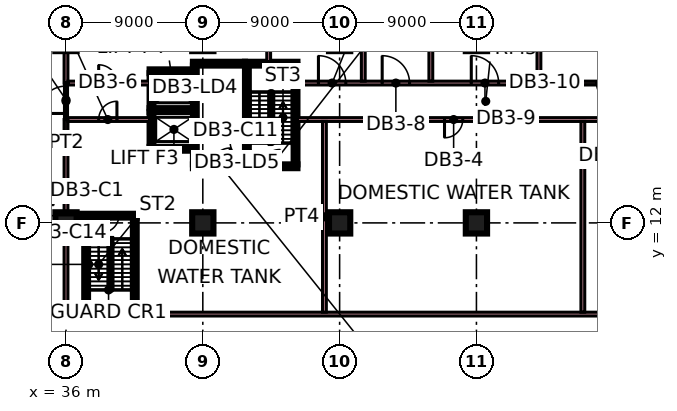
"""IFC4 building model, lengths in metres.
Left out: names, types, materials, properties, quantities, classifications, styles, units other than length and angle.
Written with IfcOpenShell. Run it as: python <this file> out.ifc"""

import sys

from ifc_helpers import new_model, si_unit, direction, frame, frame_2d, origin, origin_2d, place, context, subcontext, project, spatial, rectangle, extrude, element, fill, save


model = new_model("IFC4")
c1 = context("Model", 3, precision=1e-05, world=origin(), true_north=direction((0.0, 1.0)))
c2 = subcontext(c1, "Body", "Model", "MODEL_VIEW")
j1 = project(units=[si_unit("LENGTHUNIT", "METRE"), si_unit("PLANEANGLEUNIT", "RADIAN")], contexts=[c1])
p1 = place(None, origin())
s1 = spatial("IfcSite", under=j1, at=p1, CompositionType="ELEMENT")
p2 = place(p1, origin())
s2 = spatial("IfcBuilding", under=s1, at=p2, CompositionType="ELEMENT")
p3 = place(p2, frame((0.0, 0.0, -13.5)))
s3 = spatial("IfcBuildingStorey", under=s2, at=p3, CompositionType="ELEMENT", Elevation=-13.5)
for number, where, z_axis, x_axis in (
    (1, (36.0, 12.0, 0.0), (0.0, 0.0, 1.0), (1.0, 0.0, 0.0)),
    (2, (45.0, 12.0, 0.0), (0.0, 0.0, 1.0), (1.0, 0.0, 0.0)),
    (3, (54.0, 12.0, 0.0), (0.0, 0.0, 1.0), (1.0, 0.0, 0.0)),
    (4, (63.0, 12.0, 0.0), (0.0, 0.0, 1.0), (1.0, 0.0, 0.0)),
):
    element("IfcColumn", number, at=place(p3, frame(where, z_axis=z_axis, x_axis=x_axis)), inside=s3, PredefinedType="COLUMN", context=c2, shape_type="SweptSolid", body=[
        extrude(rectangle(XDim=1.4, YDim=1.4, at=origin_2d()), origin(), (0.0, 0.0, 1.0), 4.5),
    ])
p4 = place(p3, frame((37.2, 5.725, 0.0), z_axis=(0.0, 0.0, 1.0), x_axis=(1.0, 0.0, 0.0)))
e5 = element("IfcWall", 5, at=p4, inside=s3, PredefinedType="SHEAR", context=c2, shape_type="SweptSolid", body=[
    extrude(rectangle(XDim=3.45, YDim=0.25, at=frame_2d((1.725, 0.0))), origin(), (0.0, 0.0, 1.0), 4.5),
])
p5 = place(p3, frame((36.7, 12.475, 0.0), z_axis=(0.0, 0.0, 1.0), x_axis=(1.0, 0.0, 0.0)))
e6 = element("IfcWall", 6, at=p5, inside=s3, PredefinedType="SHEAR", context=c2, shape_type="SweptSolid", body=[
    extrude(rectangle(XDim=3.95, YDim=0.25, at=frame_2d((1.975, 0.0))), origin(), (0.0, 0.0, 1.0), 4.5),
])
p6 = place(p5, frame((1.675, 0.0, 0.0)))
e7 = element("IfcOpeningElement", 7, at=p6, cuts=e6, PredefinedType="OPENING", context=c2, shape_type="SweptSolid", body=[
    extrude(rectangle(XDim=1.1, YDim=2.2, at=frame_2d((0.55, 1.1))), frame((0.0, 0.135, 0.0), z_axis=(0.0, -1.0, 0.0), x_axis=(1.0, 0.0, 0.0)), (0.0, 0.0, 1.0), 0.27),
])
for number, where, z_axis, x_axis in (
    (8, (37.325, 5.85, 0.0), (0.0, 0.0, 1.0), (0.0, 1.0, 0.0)),
    (9, (40.525, 5.85, 0.0), (0.0, 0.0, 1.0), (0.0, 1.0, 0.0)),
):
    element("IfcWall", number, at=place(p3, frame(where, z_axis=z_axis, x_axis=x_axis)), inside=s3, PredefinedType="SHEAR", context=c2, shape_type="SweptSolid", body=[
        extrude(rectangle(XDim=6.5, YDim=0.25, at=frame_2d((3.25, 0.0))), origin(), (0.0, 0.0, 1.0), 4.5),
    ])
p7 = place(p3, frame((47.775, 15.725, 0.0), z_axis=(0.0, 0.0, 1.0), x_axis=(1.0, 0.0, 0.0)))
e10 = element("IfcWall", 10, at=p7, inside=s3, PredefinedType="SHEAR", context=c2, shape_type="SweptSolid", body=[
    extrude(rectangle(XDim=3.45, YDim=0.25, at=frame_2d((1.725, 0.0))), origin(), (0.0, 0.0, 1.0), 4.5),
])
p8 = place(p7, frame((1.175, 0.0, 0.0)))
e11 = element("IfcOpeningElement", 11, at=p8, cuts=e10, PredefinedType="OPENING", context=c2, shape_type="SweptSolid", body=[
    extrude(rectangle(XDim=1.1, YDim=2.2, at=frame_2d((0.55, 1.1))), frame((0.0, 0.135, 0.0), z_axis=(0.0, -1.0, 0.0), x_axis=(1.0, 0.0, 0.0)), (0.0, 0.0, 1.0), 0.27),
])
p9 = place(p3, frame((47.775, 22.475, 0.0), z_axis=(0.0, 0.0, 1.0), x_axis=(1.0, 0.0, 0.0)))
e12 = element("IfcWall", 12, at=p9, inside=s3, PredefinedType="SHEAR", context=c2, shape_type="SweptSolid", body=[
    extrude(rectangle(XDim=3.45, YDim=0.25, at=frame_2d((1.725, 0.0))), origin(), (0.0, 0.0, 1.0), 4.5),
])
p10 = place(p3, frame((47.9, 15.85, 0.0), z_axis=(0.0, 0.0, 1.0), x_axis=(0.0, 1.0, 0.0)))
e13 = element("IfcWall", 13, at=p10, inside=s3, PredefinedType="SHEAR", context=c2, shape_type="SweptSolid", body=[
    extrude(rectangle(XDim=6.5, YDim=0.25, at=frame_2d((3.25, 0.0))), origin(), (0.0, 0.0, 1.0), 4.5),
])
p11 = place(p10, frame((0.35, 0.0, 0.0)))
e14 = element("IfcOpeningElement", 14, at=p11, cuts=e13, PredefinedType="OPENING", context=c2, shape_type="SweptSolid", body=[
    extrude(rectangle(XDim=1.1, YDim=2.2, at=frame_2d((0.55, 1.1))), frame((0.0, 0.135, 0.0), z_axis=(0.0, -1.0, 0.0), x_axis=(1.0, 0.0, 0.0)), (0.0, 0.0, 1.0), 0.27),
])
p12 = place(p3, frame((51.1, 15.85, 0.0), z_axis=(0.0, 0.0, 1.0), x_axis=(0.0, 1.0, 0.0)))
e15 = element("IfcWall", 15, at=p12, inside=s3, PredefinedType="SHEAR", context=c2, shape_type="SweptSolid", body=[
    extrude(rectangle(XDim=6.5, YDim=0.25, at=frame_2d((3.25, 0.0))), origin(), (0.0, 0.0, 1.0), 4.5),
])
p13 = place(p3, frame((44.35, 15.725, 0.0), z_axis=(0.0, 0.0, 1.0), x_axis=(1.0, 0.0, 0.0)))
e16 = element("IfcWall", 16, at=p13, inside=s3, PredefinedType="SHEAR", context=c2, shape_type="SweptSolid", body=[
    extrude(rectangle(XDim=3.425, YDim=0.25, at=frame_2d((1.712, 0.0))), origin(), (0.0, 0.0, 1.0), 4.5),
])
p14 = place(p13, frame((1.25, 0.0, 0.0)))
e17 = element("IfcOpeningElement", 17, at=p14, cuts=e16, PredefinedType="OPENING", context=c2, shape_type="SweptSolid", body=[
    extrude(rectangle(XDim=1.2, YDim=2.2, at=frame_2d((0.6, 1.1))), frame((0.0, 0.135, 0.0), z_axis=(0.0, -1.0, 0.0), x_axis=(1.0, 0.0, 0.0)), (0.0, 0.0, 1.0), 0.27),
])
p15 = place(p3, frame((44.35, 22.475, 0.0), z_axis=(0.0, 0.0, 1.0), x_axis=(1.0, 0.0, 0.0)))
e18 = element("IfcWall", 18, at=p15, inside=s3, PredefinedType="SHEAR", context=c2, shape_type="SweptSolid", body=[
    extrude(rectangle(XDim=3.425, YDim=0.25, at=frame_2d((1.712, 0.0))), origin(), (0.0, 0.0, 1.0), 4.5),
])
p16 = place(p3, frame((44.475, 15.85, 0.0), z_axis=(0.0, 0.0, 1.0), x_axis=(0.0, 1.0, 0.0)))
e19 = element("IfcWall", 19, at=p16, inside=s3, PredefinedType="SHEAR", context=c2, shape_type="SweptSolid", body=[
    extrude(rectangle(XDim=6.5, YDim=0.25, at=frame_2d((3.25, 0.0))), origin(), (0.0, 0.0, 1.0), 4.5),
])
p17 = place(p16, frame((1.75, 0.0, 0.0)))
e20 = element("IfcOpeningElement", 20, at=p17, cuts=e19, PredefinedType="OPENING", context=c2, shape_type="SweptSolid", body=[
    extrude(rectangle(XDim=1.1, YDim=2.2, at=frame_2d((0.55, 1.1))), frame((0.0, 0.135, 0.0), z_axis=(0.0, -1.0, 0.0), x_axis=(1.0, 0.0, 0.0)), (0.0, 0.0, 1.0), 0.27),
])
p18 = place(p16, frame((4.3, 0.0, 0.0)))
e21 = element("IfcOpeningElement", 21, at=p18, cuts=e19, PredefinedType="OPENING", context=c2, shape_type="SweptSolid", body=[
    extrude(rectangle(XDim=1.1, YDim=2.2, at=frame_2d((0.55, 1.1))), frame((0.0, 0.135, 0.0), z_axis=(0.0, -1.0, 0.0), x_axis=(1.0, 0.0, 0.0)), (0.0, 0.0, 1.0), 0.27),
])
for number, where, z_axis, x_axis in (
    (22, (41.5, 16.875, 0.0), (0.0, 0.0, 1.0), (1.0, 0.0, 0.0)),
    (23, (41.5, 19.425, 0.0), (0.0, 0.0, 1.0), (1.0, 0.0, 0.0)),
    (24, (41.5, 21.975, 0.0), (0.0, 0.0, 1.0), (1.0, 0.0, 0.0)),
):
    element("IfcWall", number, at=place(p3, frame(where, z_axis=z_axis, x_axis=x_axis)), inside=s3, PredefinedType="SHEAR", context=c2, shape_type="SweptSolid", body=[
        extrude(rectangle(XDim=2.85, YDim=0.25, at=frame_2d((1.425, 0.0))), origin(), (0.0, 0.0, 1.0), 4.5),
    ])
for number, where, z_axis, x_axis in (
    (25, (41.625, 17.0, 0.0), (0.0, 0.0, 1.0), (0.0, 1.0, 0.0)),
    (26, (41.625, 19.55, 0.0), (0.0, 0.0, 1.0), (0.0, 1.0, 0.0)),
):
    element("IfcWall", number, at=place(p3, frame(where, z_axis=z_axis, x_axis=x_axis)), inside=s3, PredefinedType="SHEAR", context=c2, shape_type="SweptSolid", body=[
        extrude(rectangle(XDim=2.3, YDim=0.25, at=frame_2d((1.15, 0.0))), origin(), (0.0, 0.0, 1.0), 4.5),
    ])
p19 = place(p3, frame((36.0, 5.875, 0.0), z_axis=(0.0, 0.0, 1.0), x_axis=(0.0, 1.0, 0.0)))
e27 = element("IfcWall", 27, at=p19, inside=s3, PredefinedType="PARTITIONING", context=c2, shape_type="SweptSolid", body=[
    extrude(rectangle(XDim=5.426, YDim=0.25, at=frame_2d((2.713, 0.0))), origin(), (0.0, 0.0, 1.0), 4.05),
])
p20 = place(p3, frame((36.0, 12.699, 0.0), z_axis=(0.0, 0.0, 1.0), x_axis=(0.0, 1.0, 0.0)))
e28 = element("IfcWall", 28, at=p20, inside=s3, PredefinedType="PARTITIONING", context=c2, shape_type="SweptSolid", body=[
    extrude(rectangle(XDim=6.101, YDim=0.25, at=frame_2d((3.051, 0.0))), origin(), (0.0, 0.0, 1.0), 4.05),
])
p21 = place(p3, frame((36.0, 18.8, 0.0), z_axis=(0.0, 0.0, 1.0), x_axis=(0.0, 1.0, 0.0)))
e29 = element("IfcWall", 29, at=p21, inside=s3, PredefinedType="PARTITIONING", context=c2, shape_type="SweptSolid", body=[
    extrude(rectangle(XDim=2.4, YDim=0.2, at=frame_2d((1.2, 0.0))), origin(), (0.0, 0.0, 1.0), 4.05),
])
p22 = place(p21, frame((0.4, 0.0, 0.0)))
e30 = element("IfcOpeningElement", 30, at=p22, cuts=e29, PredefinedType="OPENING", context=c2, shape_type="SweptSolid", body=[
    extrude(rectangle(XDim=1.8, YDim=2.1, at=frame_2d((0.9, 1.05))), frame((0.0, 0.11, 0.0), z_axis=(0.0, -1.0, 0.0), x_axis=(1.0, 0.0, 0.0)), (0.0, 0.0, 1.0), 0.22),
])
p23 = place(p3, frame((36.0, 21.2, 0.0), z_axis=(0.0, 0.0, 1.0), x_axis=(0.0, 1.0, 0.0)))
e31 = element("IfcWall", 31, at=p23, inside=s3, PredefinedType="PARTITIONING", context=c2, shape_type="SweptSolid", body=[
    extrude(rectangle(XDim=2.101, YDim=0.25, at=frame_2d((1.051, 0.0))), origin(), (0.0, 0.0, 1.0), 4.05),
])
p24 = place(p3, frame((36.125, 6.0, 0.0), z_axis=(0.0, 0.0, 1.0), x_axis=(1.0, 0.0, 0.0)))
e32 = element("IfcWall", 32, at=p24, inside=s3, PredefinedType="PARTITIONING", context=c2, shape_type="SweptSolid", body=[
    extrude(rectangle(XDim=1.075, YDim=0.25, at=frame_2d((0.538, 0.0))), origin(), (0.0, 0.0, 1.0), 4.05),
])
p25 = place(p3, frame((36.125, 18.8, 0.0), z_axis=(0.0, 0.0, 1.0), x_axis=(1.0, 0.0, 0.0)))
e33 = element("IfcWall", 33, at=p25, inside=s3, PredefinedType="PARTITIONING", context=c2, shape_type="SweptSolid", body=[
    extrude(rectangle(XDim=5.375, YDim=0.25, at=frame_2d((2.688, 0.0))), origin(), (0.0, 0.0, 1.0), 4.05),
])
p26 = place(p25, frame((2.025, 0.0, 0.0)))
e34 = element("IfcOpeningElement", 34, at=p26, cuts=e33, PredefinedType="OPENING", context=c2, shape_type="SweptSolid", body=[
    extrude(rectangle(XDim=1.2, YDim=2.1, at=frame_2d((0.6, 1.05))), frame((0.0, 0.135, 0.0), z_axis=(0.0, -1.0, 0.0), x_axis=(1.0, 0.0, 0.0)), (0.0, 0.0, 1.0), 0.27),
])
p27 = place(p3, frame((36.125, 21.2, 0.0), z_axis=(0.0, 0.0, 1.0), x_axis=(1.0, 0.0, 0.0)))
e35 = element("IfcWall", 35, at=p27, inside=s3, PredefinedType="PARTITIONING", context=c2, shape_type="SweptSolid", body=[
    extrude(rectangle(XDim=5.375, YDim=0.25, at=frame_2d((2.688, 0.0))), origin(), (0.0, 0.0, 1.0), 4.05),
])
p28 = place(p27, frame((2.025, 0.0, 0.0)))
e36 = element("IfcOpeningElement", 36, at=p28, cuts=e35, PredefinedType="OPENING", context=c2, shape_type="SweptSolid", body=[
    extrude(rectangle(XDim=1.2, YDim=2.1, at=frame_2d((0.6, 1.05))), frame((0.0, 0.135, 0.0), z_axis=(0.0, -1.0, 0.0), x_axis=(1.0, 0.0, 0.0)), (0.0, 0.0, 1.0), 0.27),
])
p29 = place(p3, frame((40.65, 6.0, 0.0), z_axis=(0.0, 0.0, 1.0), x_axis=(1.0, 0.0, 0.0)))
e37 = element("IfcWall", 37, at=p29, inside=s3, PredefinedType="PARTITIONING", context=c2, shape_type="SweptSolid", body=[
    extrude(rectangle(XDim=35.475, YDim=0.25, at=frame_2d((17.738, 0.0))), origin(), (0.0, 0.0, 1.0), 4.05),
])
p30 = place(p3, frame((49.333, 22.6, 0.0), z_axis=(0.0, 0.0, 1.0), x_axis=(0.0, 1.0, 0.0)))
e38 = element("IfcWall", 38, at=p30, inside=s3, PredefinedType="PARTITIONING", context=c2, shape_type="SweptSolid", body=[
    extrude(rectangle(XDim=9.275, YDim=0.25, at=frame_2d((4.637, 0.0))), origin(), (0.0, 0.0, 1.0), 4.05),
])
p31 = place(p3, frame((51.225, 18.8, 0.0), z_axis=(0.0, 0.0, 1.0), x_axis=(1.0, 0.0, 0.0)))
e39 = element("IfcWall", 39, at=p31, inside=s3, PredefinedType="PARTITIONING", context=c2, shape_type="SweptSolid", body=[
    extrude(rectangle(XDim=24.65, YDim=0.25, at=frame_2d((12.325, 0.0))), origin(), (0.0, 0.0, 1.0), 4.05),
])
p32 = place(p31, frame((9.675, 0.0, 0.0)))
e40 = element("IfcOpeningElement", 40, at=p32, cuts=e39, PredefinedType="OPENING", context=c2, shape_type="SweptSolid", body=[
    extrude(rectangle(XDim=1.2, YDim=2.1, at=frame_2d((0.6, 1.05))), frame((0.0, 0.135, 0.0), z_axis=(0.0, -1.0, 0.0), x_axis=(1.0, 0.0, 0.0)), (0.0, 0.0, 1.0), 0.27),
])
p33 = place(p31, frame((20.925, 0.0, 0.0)))
e41 = element("IfcOpeningElement", 41, at=p33, cuts=e39, PredefinedType="OPENING", context=c2, shape_type="SweptSolid", body=[
    extrude(rectangle(XDim=1.8, YDim=2.1, at=frame_2d((0.9, 1.05))), frame((0.0, 0.135, 0.0), z_axis=(0.0, -1.0, 0.0), x_axis=(1.0, 0.0, 0.0)), (0.0, 0.0, 1.0), 0.27),
])
p34 = place(p3, frame((51.225, 21.2, 0.0), z_axis=(0.0, 0.0, 1.0), x_axis=(1.0, 0.0, 0.0)))
e42 = element("IfcWall", 42, at=p34, inside=s3, PredefinedType="PARTITIONING", context=c2, shape_type="SweptSolid", body=[
    extrude(rectangle(XDim=24.65, YDim=0.25, at=frame_2d((12.325, 0.0))), origin(), (0.0, 0.0, 1.0), 4.05),
])
p35 = place(p34, frame((1.381, 0.0, 0.0)))
e43 = element("IfcOpeningElement", 43, at=p35, cuts=e42, PredefinedType="OPENING", context=c2, shape_type="SweptSolid", body=[
    extrude(rectangle(XDim=1.8, YDim=2.1, at=frame_2d((0.9, 1.05))), frame((0.0, 0.135, 0.0), z_axis=(0.0, -1.0, 0.0), x_axis=(1.0, 0.0, 0.0)), (0.0, 0.0, 1.0), 0.27),
])
p36 = place(p34, frame((5.575, 0.0, 0.0)))
e44 = element("IfcOpeningElement", 44, at=p36, cuts=e42, PredefinedType="OPENING", context=c2, shape_type="SweptSolid", body=[
    extrude(rectangle(XDim=1.8, YDim=2.1, at=frame_2d((0.9, 1.05))), frame((0.0, 0.135, 0.0), z_axis=(0.0, -1.0, 0.0), x_axis=(1.0, 0.0, 0.0)), (0.0, 0.0, 1.0), 0.27),
])
p37 = place(p34, frame((11.436, 0.0, 0.0)))
e45 = element("IfcOpeningElement", 45, at=p37, cuts=e42, PredefinedType="OPENING", context=c2, shape_type="SweptSolid", body=[
    extrude(rectangle(XDim=1.8, YDim=2.1, at=frame_2d((0.9, 1.05))), frame((0.0, 0.135, 0.0), z_axis=(0.0, -1.0, 0.0), x_axis=(1.0, 0.0, 0.0)), (0.0, 0.0, 1.0), 0.27),
])
p38 = place(p34, frame((19.675, 0.0, 0.0)))
e46 = element("IfcOpeningElement", 46, at=p38, cuts=e42, PredefinedType="OPENING", context=c2, shape_type="SweptSolid", body=[
    extrude(rectangle(XDim=1.2, YDim=2.1, at=frame_2d((0.6, 1.05))), frame((0.0, 0.135, 0.0), z_axis=(0.0, -1.0, 0.0), x_axis=(1.0, 0.0, 0.0)), (0.0, 0.0, 1.0), 0.27),
])
p39 = place(p3, frame((53.0, 6.125, 0.0), z_axis=(0.0, 0.0, 1.0), x_axis=(0.0, 1.0, 0.0)))
e47 = element("IfcWall", 47, at=p39, inside=s3, PredefinedType="PARTITIONING", context=c2, shape_type="SweptSolid", body=[
    extrude(rectangle(XDim=12.55, YDim=0.25, at=frame_2d((6.275, 0.0))), origin(), (0.0, 0.0, 1.0), 4.05),
])
for number, where, z_axis, x_axis in (
    (48, (55.556, 21.325, 0.0), (0.0, 0.0, 1.0), (0.0, 1.0, 0.0)),
    (49, (60.0, 21.325, 0.0), (0.0, 0.0, 1.0), (0.0, 1.0, 0.0)),
    (50, (67.111, 21.325, 0.0), (0.0, 0.0, 1.0), (0.0, 1.0, 0.0)),
):
    element("IfcWall", number, at=place(p3, frame(where, z_axis=z_axis, x_axis=x_axis)), inside=s3, PredefinedType="PARTITIONING", context=c2, shape_type="SweptSolid", body=[
        extrude(rectangle(XDim=10.55, YDim=0.25, at=frame_2d((5.275, 0.0))), origin(), (0.0, 0.0, 1.0), 4.05),
    ])
p40 = place(p3, frame((70.0, 6.125, 0.0), z_axis=(0.0, 0.0, 1.0), x_axis=(0.0, 1.0, 0.0)))
e51 = element("IfcWall", 51, at=p40, inside=s3, PredefinedType="PARTITIONING", context=c2, shape_type="SweptSolid", body=[
    extrude(rectangle(XDim=12.55, YDim=0.25, at=frame_2d((6.275, 0.0))), origin(), (0.0, 0.0, 1.0), 4.05),
])
p41 = place(p6, frame((1.1, 0.0, 0.0), z_axis=(0.0, 0.0, 1.0), x_axis=(-1.0, 0.0, 0.0)))
e52 = element("IfcDoor", 52, at=p41, inside=s3, OperationType="SINGLE_SWING_LEFT", PredefinedType="DOOR", context=c2, shape_type="SweptSolid", body=[
    extrude(rectangle(XDim=1.1, YDim=2.2, at=frame_2d((0.55, 1.1))), frame((0.0, 0.025, 0.0), z_axis=(0.0, -1.0, 0.0), x_axis=(1.0, 0.0, 0.0)), (0.0, 0.0, 1.0), 0.05),
])
fill(e7, e52)
p42 = place(p8, frame((1.1, 0.0, 0.0), z_axis=(0.0, 0.0, 1.0), x_axis=(-1.0, 0.0, 0.0)))
e53 = element("IfcDoor", 53, at=p42, inside=s3, OperationType="SINGLE_SWING_RIGHT", PredefinedType="DOOR", context=c2, shape_type="SweptSolid", body=[
    extrude(rectangle(XDim=1.1, YDim=2.2, at=frame_2d((0.55, 1.1))), frame((0.0, 0.025, 0.0), z_axis=(0.0, -1.0, 0.0), x_axis=(1.0, 0.0, 0.0)), (0.0, 0.0, 1.0), 0.05),
])
fill(e11, e53)
p43 = place(p14, frame((1.2, 0.0, 0.0), z_axis=(0.0, 0.0, 1.0), x_axis=(-1.0, 0.0, 0.0)))
e54 = element("IfcDoor", 54, at=p43, inside=s3, OperationType="SINGLE_SWING_RIGHT", PredefinedType="DOOR", context=c2, shape_type="SweptSolid", body=[
    extrude(rectangle(XDim=1.2, YDim=2.2, at=frame_2d((0.6, 1.1))), frame((0.0, 0.025, 0.0), z_axis=(0.0, -1.0, 0.0), x_axis=(1.0, 0.0, 0.0)), (0.0, 0.0, 1.0), 0.05),
])
fill(e17, e54)
p44 = place(p11, frame((1.1, 0.0, 0.0), z_axis=(0.0, 0.0, 1.0), x_axis=(-1.0, 0.0, 0.0)))
e55 = element("IfcDoor", 55, at=p44, inside=s3, OperationType="SINGLE_SWING_RIGHT", PredefinedType="DOOR", context=c2, shape_type="SweptSolid", body=[
    extrude(rectangle(XDim=1.1, YDim=2.2, at=frame_2d((0.55, 1.1))), frame((0.0, 0.025, 0.0), z_axis=(0.0, -1.0, 0.0), x_axis=(1.0, 0.0, 0.0)), (0.0, 0.0, 1.0), 0.05),
])
fill(e14, e55)
p45 = place(p17, origin())
e56 = element("IfcDoor", 56, at=p45, inside=s3, OperationType="DOUBLE_DOOR_SLIDING", PredefinedType="DOOR", context=c2, shape_type="SweptSolid", body=[
    extrude(rectangle(XDim=1.1, YDim=2.2, at=frame_2d((0.55, 1.1))), frame((0.0, 0.025, 0.0), z_axis=(0.0, -1.0, 0.0), x_axis=(1.0, 0.0, 0.0)), (0.0, 0.0, 1.0), 0.05),
])
fill(e20, e56)
p46 = place(p18, origin())
e57 = element("IfcDoor", 57, at=p46, inside=s3, OperationType="DOUBLE_DOOR_SLIDING", PredefinedType="DOOR", context=c2, shape_type="SweptSolid", body=[
    extrude(rectangle(XDim=1.1, YDim=2.2, at=frame_2d((0.55, 1.1))), frame((0.0, 0.025, 0.0), z_axis=(0.0, -1.0, 0.0), x_axis=(1.0, 0.0, 0.0)), (0.0, 0.0, 1.0), 0.05),
])
fill(e21, e57)
p47 = place(p22, origin())
e58 = element("IfcDoor", 58, at=p47, inside=s3, OperationType="DOUBLE_DOOR_SINGLE_SWING", PredefinedType="DOOR", context=c2, shape_type="SweptSolid", body=[
    extrude(rectangle(XDim=1.8, YDim=2.1, at=frame_2d((0.9, 1.05))), frame((0.0, 0.025, 0.0), z_axis=(0.0, -1.0, 0.0), x_axis=(1.0, 0.0, 0.0)), (0.0, 0.0, 1.0), 0.05),
])
fill(e30, e58)
p48 = place(p26, frame((1.2, 0.0, 0.0), z_axis=(0.0, 0.0, 1.0), x_axis=(-1.0, 0.0, 0.0)))
e59 = element("IfcDoor", 59, at=p48, inside=s3, OperationType="SINGLE_SWING_RIGHT", PredefinedType="DOOR", context=c2, shape_type="SweptSolid", body=[
    extrude(rectangle(XDim=1.2, YDim=2.1, at=frame_2d((0.6, 1.05))), frame((0.0, 0.025, 0.0), z_axis=(0.0, -1.0, 0.0), x_axis=(1.0, 0.0, 0.0)), (0.0, 0.0, 1.0), 0.05),
])
fill(e34, e59)
p49 = place(p32, frame((1.2, 0.0, 0.0), z_axis=(0.0, 0.0, 1.0), x_axis=(-1.0, 0.0, 0.0)))
e60 = element("IfcDoor", 60, at=p49, inside=s3, OperationType="SINGLE_SWING_LEFT", PredefinedType="DOOR", context=c2, shape_type="SweptSolid", body=[
    extrude(rectangle(XDim=1.2, YDim=2.1, at=frame_2d((0.6, 1.05))), frame((0.0, 0.025, 0.0), z_axis=(0.0, -1.0, 0.0), x_axis=(1.0, 0.0, 0.0)), (0.0, 0.0, 1.0), 0.05),
])
fill(e40, e60)
p50 = place(p28, origin())
e61 = element("IfcDoor", 61, at=p50, inside=s3, OperationType="SINGLE_SWING_LEFT", PredefinedType="DOOR", context=c2, shape_type="SweptSolid", body=[
    extrude(rectangle(XDim=1.2, YDim=2.1, at=frame_2d((0.6, 1.05))), frame((0.0, 0.025, 0.0), z_axis=(0.0, -1.0, 0.0), x_axis=(1.0, 0.0, 0.0)), (0.0, 0.0, 1.0), 0.05),
])
fill(e36, e61)
p51 = place(p35, origin())
e62 = element("IfcDoor", 62, at=p51, inside=s3, OperationType="DOUBLE_DOOR_SINGLE_SWING", PredefinedType="DOOR", context=c2, shape_type="SweptSolid", body=[
    extrude(rectangle(XDim=1.8, YDim=2.1, at=frame_2d((0.9, 1.05))), frame((0.0, 0.025, 0.0), z_axis=(0.0, -1.0, 0.0), x_axis=(1.0, 0.0, 0.0)), (0.0, 0.0, 1.0), 0.05),
])
fill(e43, e62)
p52 = place(p36, origin())
e63 = element("IfcDoor", 63, at=p52, inside=s3, OperationType="DOUBLE_DOOR_SINGLE_SWING", PredefinedType="DOOR", context=c2, shape_type="SweptSolid", body=[
    extrude(rectangle(XDim=1.8, YDim=2.1, at=frame_2d((0.9, 1.05))), frame((0.0, 0.025, 0.0), z_axis=(0.0, -1.0, 0.0), x_axis=(1.0, 0.0, 0.0)), (0.0, 0.0, 1.0), 0.05),
])
fill(e44, e63)
p53 = place(p37, origin())
e64 = element("IfcDoor", 64, at=p53, inside=s3, OperationType="DOUBLE_DOOR_SINGLE_SWING", PredefinedType="DOOR", context=c2, shape_type="SweptSolid", body=[
    extrude(rectangle(XDim=1.8, YDim=2.1, at=frame_2d((0.9, 1.05))), frame((0.0, 0.025, 0.0), z_axis=(0.0, -1.0, 0.0), x_axis=(1.0, 0.0, 0.0)), (0.0, 0.0, 1.0), 0.05),
])
fill(e45, e64)
p54 = place(p38, origin())
e65 = element("IfcDoor", 65, at=p54, inside=s3, OperationType="SINGLE_SWING_RIGHT", PredefinedType="DOOR", context=c2, shape_type="SweptSolid", body=[
    extrude(rectangle(XDim=1.2, YDim=2.1, at=frame_2d((0.6, 1.05))), frame((0.0, 0.025, 0.0), z_axis=(0.0, -1.0, 0.0), x_axis=(1.0, 0.0, 0.0)), (0.0, 0.0, 1.0), 0.05),
])
fill(e46, e65)
save(model, sys.argv[1])
